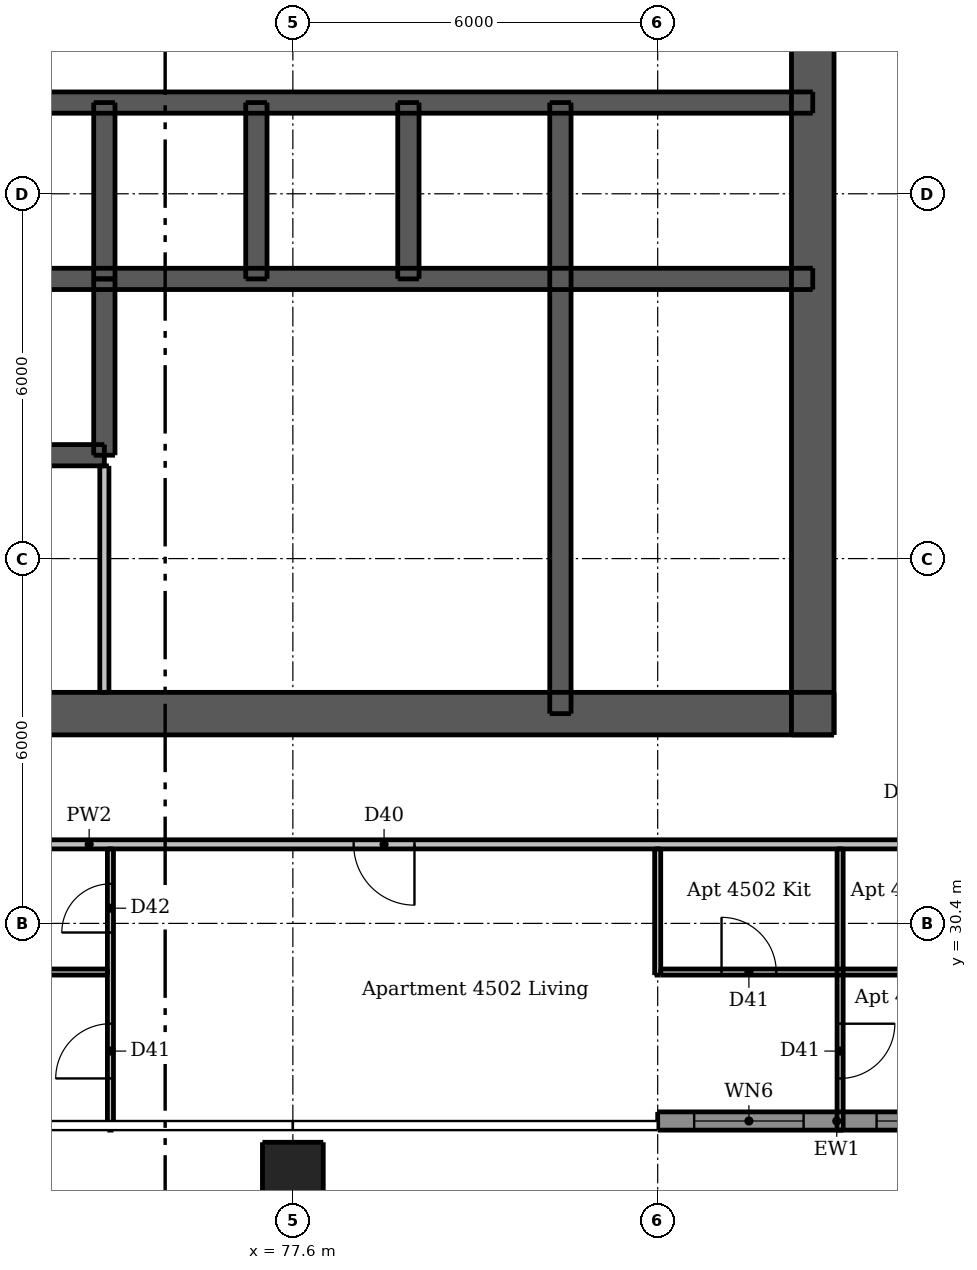
"""IFC4 building model, lengths in metres.
Left out: names, types, materials, properties, quantities, classifications, styles, units other than length and angle.
Written with IfcOpenShell. Run it as: python <this file> out.ifc"""

import sys

from ifc_helpers import new_model, si_unit, direction, frame, frame_2d, origin, origin_2d, place, context, subcontext, project, spatial, rectangle, extrude, element, fill, save


model = new_model("IFC4")
c1 = context("Model", 3, precision=1e-05, world=origin(), true_north=direction((0.0, 1.0)))
c2 = subcontext(c1, "Body", "Model", "MODEL_VIEW")
j1 = project(units=[si_unit("LENGTHUNIT", "METRE"), si_unit("PLANEANGLEUNIT", "RADIAN")], contexts=[c1])
p1 = place(None, origin())
s1 = spatial("IfcSite", under=j1, at=p1, CompositionType="ELEMENT")
p2 = place(p1, origin())
s2 = spatial("IfcBuilding", under=s1, at=p2, CompositionType="ELEMENT")
p3 = place(p2, frame((0.0, 0.0, 168.1)))
s3 = spatial("IfcBuildingStorey", under=s2, at=p3, CompositionType="ELEMENT", Elevation=168.1)
p4 = place(p3, frame((62.5, 33.85, 0.0), z_axis=(0.0, 0.0, 1.0), x_axis=(1.0, 0.0, 0.0)))
e1 = element("IfcWall", 1, at=p4, inside=s3, PredefinedType="SHEAR", context=c2, shape_type="SweptSolid", body=[
    extrude(rectangle(XDim=24.0, YDim=0.7, at=frame_2d((12.0, 0.0))), origin(), (0.0, 0.0, 1.0), 3.05),
])
p5 = place(p4, frame((1.962, 0.0, 0.0)))
e2 = element("IfcOpeningElement", 2, at=p5, cuts=e1, PredefinedType="OPENING", context=c2, shape_type="SweptSolid", body=[
    extrude(rectangle(XDim=1.1, YDim=2.1, at=frame_2d((0.55, 1.05))), frame((0.0, 0.36, 0.0), z_axis=(0.0, -1.0, 0.0), x_axis=(1.0, 0.0, 0.0)), (0.0, 0.0, 1.0), 0.72),
])
p6 = place(p4, frame((20.938, 0.0, 0.0)))
e3 = element("IfcOpeningElement", 3, at=p6, cuts=e1, PredefinedType="OPENING", context=c2, shape_type="SweptSolid", body=[
    extrude(rectangle(XDim=1.1, YDim=2.1, at=frame_2d((0.55, 1.05))), frame((0.0, 0.36, 0.0), z_axis=(0.0, -1.0, 0.0), x_axis=(1.0, 0.0, 0.0)), (0.0, 0.0, 1.0), 0.72),
])
p7 = place(p4, frame((8.0, 0.0, 0.0)))
e4 = element("IfcOpeningElement", 4, at=p7, cuts=e1, PredefinedType="OPENING", context=c2, shape_type="SweptSolid", body=[
    extrude(rectangle(XDim=1.1, YDim=2.1, at=frame_2d((0.55, 1.05))), frame((0.0, 0.36, 0.0), z_axis=(0.0, -1.0, 0.0), x_axis=(1.0, 0.0, 0.0)), (0.0, 0.0, 1.0), 0.72),
])
p8 = place(p4, frame((15.3, 0.0, 0.0)))
e5 = element("IfcOpeningElement", 5, at=p8, cuts=e1, PredefinedType="OPENING", context=c2, shape_type="SweptSolid", body=[
    extrude(rectangle(XDim=0.9, YDim=2.1, at=frame_2d((0.45, 1.05))), frame((0.0, 0.36, 0.0), z_axis=(0.0, -1.0, 0.0), x_axis=(1.0, 0.0, 0.0)), (0.0, 0.0, 1.0), 0.72),
])
p9 = place(p3, frame((86.15, 33.5, 0.0), z_axis=(0.0, 0.0, 1.0), x_axis=(0.0, 1.0, 0.0)))
e6 = element("IfcWall", 6, at=p9, inside=s3, PredefinedType="SHEAR", context=c2, shape_type="SweptSolid", body=[
    extrude(rectangle(XDim=24.0, YDim=0.7, at=frame_2d((12.0, 0.0))), origin(), (0.0, 0.0, 1.0), 3.05),
])
p10 = place(p9, frame((11.2, 0.0, 0.0)))
e7 = element("IfcOpeningElement", 7, at=p10, cuts=e6, PredefinedType="OPENING", context=c2, shape_type="SweptSolid", body=[
    extrude(rectangle(XDim=1.6, YDim=2.1, at=frame_2d((0.8, 1.05))), frame((0.0, 0.36, 0.0), z_axis=(0.0, -1.0, 0.0), x_axis=(1.0, 0.0, 0.0)), (0.0, 0.0, 1.0), 0.72),
])
p11 = place(p3, frame((62.85, 41.0, 0.0), z_axis=(0.0, 0.0, 1.0), x_axis=(1.0, 0.0, 0.0)))
e8 = element("IfcWall", 8, at=p11, inside=s3, PredefinedType="SHEAR", context=c2, shape_type="SweptSolid", body=[
    extrude(rectangle(XDim=23.3, YDim=0.35, at=frame_2d((11.65, 0.0))), origin(), (0.0, 0.0, 1.0), 3.05),
])
p12 = place(p3, frame((62.85, 43.9, 0.0), z_axis=(0.0, 0.0, 1.0), x_axis=(1.0, 0.0, 0.0)))
e9 = element("IfcWall", 9, at=p12, inside=s3, PredefinedType="SHEAR", context=c2, shape_type="SweptSolid", body=[
    extrude(rectangle(XDim=23.3, YDim=0.35, at=frame_2d((11.65, 0.0))), origin(), (0.0, 0.0, 1.0), 3.05),
])
p13 = place(p12, frame((0.806, 0.0, 0.0)))
e10 = element("IfcOpeningElement", 10, at=p13, cuts=e9, PredefinedType="OPENING", context=c2, shape_type="SweptSolid", body=[
    extrude(rectangle(XDim=0.9, YDim=2.1, at=frame_2d((0.45, 1.05))), frame((0.0, 0.185, 0.0), z_axis=(0.0, -1.0, 0.0), x_axis=(1.0, 0.0, 0.0)), (0.0, 0.0, 1.0), 0.37),
])
p14 = place(p12, frame((2.619, 0.0, 0.0)))
e11 = element("IfcOpeningElement", 11, at=p14, cuts=e9, PredefinedType="OPENING", context=c2, shape_type="SweptSolid", body=[
    extrude(rectangle(XDim=0.9, YDim=2.1, at=frame_2d((0.45, 1.05))), frame((0.0, 0.185, 0.0), z_axis=(0.0, -1.0, 0.0), x_axis=(1.0, 0.0, 0.0)), (0.0, 0.0, 1.0), 0.37),
])
p15 = place(p12, frame((20.688, 0.0, 0.0)))
e12 = element("IfcOpeningElement", 12, at=p15, cuts=e9, PredefinedType="OPENING", context=c2, shape_type="SweptSolid", body=[
    extrude(rectangle(XDim=0.9, YDim=2.1, at=frame_2d((0.45, 1.05))), frame((0.0, 0.185, 0.0), z_axis=(0.0, -1.0, 0.0), x_axis=(1.0, 0.0, 0.0)), (0.0, 0.0, 1.0), 0.37),
])
p16 = place(p12, frame((7.45, 0.0, 0.0)))
e13 = element("IfcOpeningElement", 13, at=p16, cuts=e9, PredefinedType="OPENING", context=c2, shape_type="SweptSolid", body=[
    extrude(rectangle(XDim=0.9, YDim=2.1, at=frame_2d((0.45, 1.05))), frame((0.0, 0.185, 0.0), z_axis=(0.0, -1.0, 0.0), x_axis=(1.0, 0.0, 0.0)), (0.0, 0.0, 1.0), 0.37),
])
p17 = place(p12, frame((9.95, 0.0, 0.0)))
e14 = element("IfcOpeningElement", 14, at=p17, cuts=e9, PredefinedType="OPENING", context=c2, shape_type="SweptSolid", body=[
    extrude(rectangle(XDim=0.9, YDim=2.1, at=frame_2d((0.45, 1.05))), frame((0.0, 0.185, 0.0), z_axis=(0.0, -1.0, 0.0), x_axis=(1.0, 0.0, 0.0)), (0.0, 0.0, 1.0), 0.37),
])
p18 = place(p12, frame((14.95, 0.0, 0.0)))
e15 = element("IfcOpeningElement", 15, at=p18, cuts=e9, PredefinedType="OPENING", context=c2, shape_type="SweptSolid", body=[
    extrude(rectangle(XDim=0.9, YDim=2.1, at=frame_2d((0.45, 1.05))), frame((0.0, 0.185, 0.0), z_axis=(0.0, -1.0, 0.0), x_axis=(1.0, 0.0, 0.0)), (0.0, 0.0, 1.0), 0.37),
])
p19 = place(p12, frame((17.45, 0.0, 0.0)))
e16 = element("IfcOpeningElement", 16, at=p19, cuts=e9, PredefinedType="OPENING", context=c2, shape_type="SweptSolid", body=[
    extrude(rectangle(XDim=0.9, YDim=2.1, at=frame_2d((0.45, 1.05))), frame((0.0, 0.185, 0.0), z_axis=(0.0, -1.0, 0.0), x_axis=(1.0, 0.0, 0.0)), (0.0, 0.0, 1.0), 0.37),
])
p20 = place(p3, frame((82.0, 33.85, 0.0), z_axis=(0.0, 0.0, 1.0), x_axis=(0.0, 1.0, 0.0)))
e17 = element("IfcWall", 17, at=p20, inside=s3, PredefinedType="SHEAR", context=c2, shape_type="SweptSolid", body=[
    extrude(rectangle(XDim=10.05, YDim=0.35, at=frame_2d((5.025, 0.0))), origin(), (0.0, 0.0, 1.0), 3.05),
])
for number, where, z_axis, x_axis in (
    (18, (74.5, 41.0, 0.0), (0.0, 0.0, 1.0), (0.0, 1.0, 0.0)),
    (19, (77.0, 41.0, 0.0), (0.0, 0.0, 1.0), (0.0, 1.0, 0.0)),
    (20, (79.5, 41.0, 0.0), (0.0, 0.0, 1.0), (0.0, 1.0, 0.0)),
):
    element("IfcWall", number, at=place(p3, frame(where, z_axis=z_axis, x_axis=x_axis)), inside=s3, PredefinedType="SHEAR", context=c2, shape_type="SweptSolid", body=[
        extrude(rectangle(XDim=2.9, YDim=0.35, at=frame_2d((1.45, 0.0))), origin(), (0.0, 0.0, 1.0), 3.05),
    ])
p21 = place(p3, frame((67.0, 38.1, 0.0), z_axis=(0.0, 0.0, 1.0), x_axis=(1.0, 0.0, 0.0)))
e21 = element("IfcWall", 21, at=p21, inside=s3, PredefinedType="SHEAR", context=c2, shape_type="SweptSolid", body=[
    extrude(rectangle(XDim=7.5, YDim=0.35, at=frame_2d((3.75, 0.0))), origin(), (0.0, 0.0, 1.0), 3.05),
])
p22 = place(p21, frame((0.7, 0.0, 0.0)))
e22 = element("IfcOpeningElement", 22, at=p22, cuts=e21, PredefinedType="OPENING", context=c2, shape_type="SweptSolid", body=[
    extrude(rectangle(XDim=1.1, YDim=2.1, at=frame_2d((0.55, 1.05))), frame((0.0, 0.185, 0.0), z_axis=(0.0, -1.0, 0.0), x_axis=(1.0, 0.0, 0.0)), (0.0, 0.0, 1.0), 0.37),
])
p23 = place(p21, frame((3.2, 0.0, 0.0)))
e23 = element("IfcOpeningElement", 23, at=p23, cuts=e21, PredefinedType="OPENING", context=c2, shape_type="SweptSolid", body=[
    extrude(rectangle(XDim=1.1, YDim=2.1, at=frame_2d((0.55, 1.05))), frame((0.0, 0.185, 0.0), z_axis=(0.0, -1.0, 0.0), x_axis=(1.0, 0.0, 0.0)), (0.0, 0.0, 1.0), 0.37),
])
p24 = place(p21, frame((5.65, 0.0, 0.0)))
e24 = element("IfcOpeningElement", 24, at=p24, cuts=e21, PredefinedType="OPENING", context=c2, shape_type="SweptSolid", body=[
    extrude(rectangle(XDim=1.2, YDim=2.1, at=frame_2d((0.6, 1.05))), frame((0.0, 0.185, 0.0), z_axis=(0.0, -1.0, 0.0), x_axis=(1.0, 0.0, 0.0)), (0.0, 0.0, 1.0), 0.37),
])
p25 = place(p3, frame((74.5, 38.1, 0.0), z_axis=(0.0, 0.0, 1.0), x_axis=(0.0, 1.0, 0.0)))
e25 = element("IfcWall", 25, at=p25, inside=s3, PredefinedType="SHEAR", context=c2, shape_type="SweptSolid", body=[
    extrude(rectangle(XDim=2.9, YDim=0.35, at=frame_2d((1.45, 0.0))), origin(), (0.0, 0.0, 1.0), 3.05),
])
p26 = place(p3, frame((77.6, 26.3, 0.0), z_axis=(0.0, 0.0, 1.0), x_axis=(1.0, 0.0, 0.0)))
e26 = element("IfcColumn", 26, at=p26, inside=s3, PredefinedType="COLUMN", context=c2, shape_type="SweptSolid", body=[
    extrude(rectangle(XDim=1.0, YDim=1.0, at=origin_2d()), origin(), (0.0, 0.0, 1.0), 3.05),
])
p27 = place(p3, frame((83.6, 27.15, 0.0), z_axis=(0.0, 0.0, 1.0), x_axis=(1.0, 0.0, 0.0)))
e27 = element("IfcWall", 27, at=p27, inside=s3, PredefinedType="SOLIDWALL", context=c2, shape_type="SweptSolid", body=[
    extrude(rectangle(XDim=5.89, YDim=0.3, at=frame_2d((2.945, 0.0))), origin(), (0.0, 0.0, 1.0), 3.05),
])
p28 = place(p27, frame((0.6, 0.0, 0.15)))
e28 = element("IfcOpeningElement", 28, at=p28, cuts=e27, PredefinedType="OPENING", context=c2, shape_type="SweptSolid", body=[
    extrude(rectangle(XDim=1.8, YDim=2.1, at=frame_2d((0.9, 1.05))), frame((0.0, 0.16, 0.0), z_axis=(0.0, -1.0, 0.0), x_axis=(1.0, 0.0, 0.0)), (0.0, 0.0, 1.0), 0.32),
])
p29 = place(p27, frame((3.6, 0.0, 0.15)))
e29 = element("IfcOpeningElement", 29, at=p29, cuts=e27, PredefinedType="OPENING", context=c2, shape_type="SweptSolid", body=[
    extrude(rectangle(XDim=1.8, YDim=2.1, at=frame_2d((0.9, 1.05))), frame((0.0, 0.16, 0.0), z_axis=(0.0, -1.0, 0.0), x_axis=(1.0, 0.0, 0.0)), (0.0, 0.0, 1.0), 0.32),
])
p30 = place(p3, frame((74.5, 34.2, 0.0), z_axis=(0.0, 0.0, 1.0), x_axis=(0.0, 1.0, 0.0)))
e30 = element("IfcWall", 30, at=p30, inside=s3, PredefinedType="PLUMBINGWALL", context=c2, shape_type="SweptSolid", body=[
    extrude(rectangle(XDim=3.725, YDim=0.15, at=frame_2d((1.863, 0.0))), origin(), (0.0, 0.0, 1.0), 3.05),
])
p31 = place(p3, frame((74.6, 27.0, 0.0), z_axis=(0.0, 0.0, 1.0), x_axis=(0.0, 1.0, 0.0)))
e31 = element("IfcWall", 31, at=p31, inside=s3, PredefinedType="PARTITIONING", context=c2, shape_type="SweptSolid", body=[
    extrude(rectangle(XDim=4.625, YDim=0.1, at=frame_2d((2.312, 0.0))), origin(), (0.0, 0.0, 1.0), 3.05),
])
p32 = place(p31, frame((0.85, 0.0, 0.0)))
e32 = element("IfcOpeningElement", 32, at=p32, cuts=e31, PredefinedType="OPENING", context=c2, shape_type="SweptSolid", body=[
    extrude(rectangle(XDim=0.9, YDim=2.1, at=frame_2d((0.45, 1.05))), frame((0.0, 0.06, 0.0), z_axis=(0.0, -1.0, 0.0), x_axis=(1.0, 0.0, 0.0)), (0.0, 0.0, 1.0), 0.12),
])
p33 = place(p31, frame((3.25, 0.0, 0.0)))
e33 = element("IfcOpeningElement", 33, at=p33, cuts=e31, PredefinedType="OPENING", context=c2, shape_type="SweptSolid", body=[
    extrude(rectangle(XDim=0.8, YDim=2.1, at=frame_2d((0.4, 1.05))), frame((0.0, 0.06, 0.0), z_axis=(0.0, -1.0, 0.0), x_axis=(1.0, 0.0, 0.0)), (0.0, 0.0, 1.0), 0.12),
])
p34 = place(p3, frame((83.6, 29.55, 0.0), z_axis=(0.0, 0.0, 1.0), x_axis=(0.0, 1.0, 0.0)))
e34 = element("IfcWall", 34, at=p34, inside=s3, PredefinedType="PARTITIONING", context=c2, shape_type="SweptSolid", body=[
    extrude(rectangle(XDim=2.075, YDim=0.1, at=frame_2d((1.038, 0.0))), origin(), (0.0, 0.0, 1.0), 2.59),
])
p35 = place(p3, frame((86.6, 31.625, 0.0), z_axis=(0.0, 0.0, 1.0), x_axis=(0.0, -1.0, 0.0)))
e35 = element("IfcWall", 35, at=p35, inside=s3, PredefinedType="PARTITIONING", context=c2, shape_type="SweptSolid", body=[
    extrude(rectangle(XDim=4.625, YDim=0.1, at=frame_2d((2.312, 0.0))), origin(), (0.0, 0.0, 1.0), 3.05),
])
p36 = place(p35, frame((2.875, 0.0, 0.0)))
e36 = element("IfcOpeningElement", 36, at=p36, cuts=e35, PredefinedType="OPENING", context=c2, shape_type="SweptSolid", body=[
    extrude(rectangle(XDim=0.9, YDim=2.1, at=frame_2d((0.45, 1.05))), frame((0.0, 0.06, 0.0), z_axis=(0.0, -1.0, 0.0), x_axis=(1.0, 0.0, 0.0)), (0.0, 0.0, 1.0), 0.12),
])
p37 = place(p3, frame((71.05, 29.6, 0.0), z_axis=(0.0, 0.0, 1.0), x_axis=(1.0, 0.0, 0.0)))
e37 = element("IfcWall", 37, at=p37, inside=s3, PredefinedType="PARTITIONING", context=c2, shape_type="SweptSolid", body=[
    extrude(rectangle(XDim=3.5, YDim=0.1, at=frame_2d((1.75, 0.0))), origin(), (0.0, 0.0, 1.0), 3.05),
])
p38 = place(p3, frame((83.65, 29.6, 0.0), z_axis=(0.0, 0.0, 1.0), x_axis=(1.0, 0.0, 0.0)))
e38 = element("IfcWall", 38, at=p38, inside=s3, PredefinedType="PARTITIONING", context=c2, shape_type="SweptSolid", body=[
    extrude(rectangle(XDim=5.875, YDim=0.1, at=frame_2d((2.938, 0.0))), origin(), (0.0, 0.0, 1.0), 3.05),
])
p39 = place(p38, frame((1.0, 0.0, 0.0)))
e39 = element("IfcOpeningElement", 39, at=p39, cuts=e38, PredefinedType="OPENING", context=c2, shape_type="SweptSolid", body=[
    extrude(rectangle(XDim=0.9, YDim=2.1, at=frame_2d((0.45, 1.05))), frame((0.0, 0.06, 0.0), z_axis=(0.0, -1.0, 0.0), x_axis=(1.0, 0.0, 0.0)), (0.0, 0.0, 1.0), 0.12),
])
p40 = place(p38, frame((4.05, 0.0, 0.0)))
e40 = element("IfcOpeningElement", 40, at=p40, cuts=e38, PredefinedType="OPENING", context=c2, shape_type="SweptSolid", body=[
    extrude(rectangle(XDim=0.8, YDim=2.1, at=frame_2d((0.4, 1.05))), frame((0.0, 0.06, 0.0), z_axis=(0.0, -1.0, 0.0), x_axis=(1.0, 0.0, 0.0)), (0.0, 0.0, 1.0), 0.12),
])
p41 = place(p3, frame((89.525, 31.7, 0.0), z_axis=(0.0, 0.0, 1.0), x_axis=(-1.0, 0.0, 0.0)))
e41 = element("IfcWall", 41, at=p41, inside=s3, PredefinedType="PARTITIONING", context=c2, shape_type="SweptSolid", body=[
    extrude(rectangle(XDim=30.55, YDim=0.15, at=frame_2d((15.275, 0.0))), origin(), (0.0, 0.0, 1.0), 3.05),
])
p42 = place(p41, frame((28.275, 0.0, 0.0)))
e42 = element("IfcOpeningElement", 42, at=p42, cuts=e41, PredefinedType="OPENING", context=c2, shape_type="SweptSolid", body=[
    extrude(rectangle(XDim=1.0, YDim=2.1, at=frame_2d((0.5, 1.05))), frame((0.0, 0.085, 0.0), z_axis=(0.0, -1.0, 0.0), x_axis=(1.0, 0.0, 0.0)), (0.0, 0.0, 1.0), 0.17),
])
p43 = place(p41, frame((9.925, 0.0, 0.0)))
e43 = element("IfcOpeningElement", 43, at=p43, cuts=e41, PredefinedType="OPENING", context=c2, shape_type="SweptSolid", body=[
    extrude(rectangle(XDim=1.0, YDim=2.1, at=frame_2d((0.5, 1.05))), frame((0.0, 0.085, 0.0), z_axis=(0.0, -1.0, 0.0), x_axis=(1.0, 0.0, 0.0)), (0.0, 0.0, 1.0), 0.17),
])
p44 = place(p28, origin())
e44 = element("IfcWindow", 44, at=p44, inside=s3, PartitioningType="DOUBLE_PANEL_VERTICAL", PredefinedType="WINDOW", context=c2, shape_type="SweptSolid", body=[
    extrude(rectangle(XDim=1.8, YDim=2.1, at=frame_2d((0.9, 1.05))), frame((0.0, 0.03, 0.0), z_axis=(0.0, -1.0, 0.0), x_axis=(1.0, 0.0, 0.0)), (0.0, 0.0, 1.0), 0.06),
])
fill(e28, e44)
p45 = place(p29, origin())
e45 = element("IfcWindow", 45, at=p45, inside=s3, PartitioningType="DOUBLE_PANEL_VERTICAL", PredefinedType="WINDOW", context=c2, shape_type="SweptSolid", body=[
    extrude(rectangle(XDim=1.8, YDim=2.1, at=frame_2d((0.9, 1.05))), frame((0.0, 0.03, 0.0), z_axis=(0.0, -1.0, 0.0), x_axis=(1.0, 0.0, 0.0)), (0.0, 0.0, 1.0), 0.06),
])
fill(e29, e45)
p46 = place(p6, origin())
e46 = element("IfcDoor", 46, at=p46, inside=s3, OperationType="SINGLE_SWING_RIGHT", PredefinedType="DOOR", context=c2, shape_type="SweptSolid", body=[
    extrude(rectangle(XDim=1.1, YDim=2.1, at=frame_2d((0.55, 1.05))), frame((0.0, 0.337, 0.0), z_axis=(0.0, -1.0, 0.0), x_axis=(1.0, 0.0, 0.0)), (0.0, 0.0, 1.0), 0.05),
])
fill(e3, e46)
p47 = place(p10, origin())
e47 = element("IfcDoor", 47, at=p47, inside=s3, OperationType="DOUBLE_DOOR_SINGLE_SWING", PredefinedType="DOOR", context=c2, shape_type="SweptSolid", body=[
    extrude(rectangle(XDim=1.6, YDim=2.1, at=frame_2d((0.8, 1.05))), frame((0.0, 0.337, 0.0), z_axis=(0.0, -1.0, 0.0), x_axis=(1.0, 0.0, 0.0)), (0.0, 0.0, 1.0), 0.05),
])
fill(e7, e47)
p48 = place(p8, origin())
e48 = element("IfcDoor", 48, at=p48, inside=s3, OperationType="SINGLE_SWING_LEFT", PredefinedType="DOOR", context=c2, shape_type="SweptSolid", body=[
    extrude(rectangle(XDim=0.9, YDim=2.1, at=frame_2d((0.45, 1.05))), frame((0.0, 0.337, 0.0), z_axis=(0.0, -1.0, 0.0), x_axis=(1.0, 0.0, 0.0)), (0.0, 0.0, 1.0), 0.05),
])
fill(e5, e48)
p49 = place(p15, origin())
e49 = element("IfcDoor", 49, at=p49, inside=s3, OperationType="SINGLE_SWING_LEFT", PredefinedType="DOOR", context=c2, shape_type="SweptSolid", body=[
    extrude(rectangle(XDim=0.9, YDim=2.1, at=frame_2d((0.45, 1.05))), frame((0.0, -0.112, 0.0), z_axis=(0.0, -1.0, 0.0), x_axis=(1.0, 0.0, 0.0)), (0.0, 0.0, 1.0), 0.05),
])
fill(e12, e49)
p50 = place(p17, origin())
e50 = element("IfcDoor", 50, at=p50, inside=s3, OperationType="SINGLE_SWING_RIGHT", PredefinedType="DOOR", context=c2, shape_type="SweptSolid", body=[
    extrude(rectangle(XDim=0.9, YDim=2.1, at=frame_2d((0.45, 1.05))), frame((0.0, -0.112, 0.0), z_axis=(0.0, -1.0, 0.0), x_axis=(1.0, 0.0, 0.0)), (0.0, 0.0, 1.0), 0.05),
])
fill(e14, e50)
p51 = place(p18, origin())
e51 = element("IfcDoor", 51, at=p51, inside=s3, OperationType="SINGLE_SWING_RIGHT", PredefinedType="DOOR", context=c2, shape_type="SweptSolid", body=[
    extrude(rectangle(XDim=0.9, YDim=2.1, at=frame_2d((0.45, 1.05))), frame((0.0, -0.112, 0.0), z_axis=(0.0, -1.0, 0.0), x_axis=(1.0, 0.0, 0.0)), (0.0, 0.0, 1.0), 0.05),
])
fill(e15, e51)
p52 = place(p19, origin())
e52 = element("IfcDoor", 52, at=p52, inside=s3, OperationType="SINGLE_SWING_LEFT", PredefinedType="DOOR", context=c2, shape_type="SweptSolid", body=[
    extrude(rectangle(XDim=0.9, YDim=2.1, at=frame_2d((0.45, 1.05))), frame((0.0, -0.112, 0.0), z_axis=(0.0, -1.0, 0.0), x_axis=(1.0, 0.0, 0.0)), (0.0, 0.0, 1.0), 0.05),
])
fill(e16, e52)
p53 = place(p24, origin())
e53 = element("IfcDoor", 53, at=p53, inside=s3, OperationType="DOUBLE_DOOR_SLIDING", PredefinedType="DOOR", context=c2, shape_type="SweptSolid", body=[
    extrude(rectangle(XDim=1.2, YDim=2.1, at=frame_2d((0.6, 1.05))), frame((0.0, 0.025, 0.0), z_axis=(0.0, -1.0, 0.0), x_axis=(1.0, 0.0, 0.0)), (0.0, 0.0, 1.0), 0.05),
])
fill(e24, e53)
p54 = place(p43, origin())
e54 = element("IfcDoor", 54, at=p54, inside=s3, OperationType="SINGLE_SWING_LEFT", PredefinedType="DOOR", context=c2, shape_type="SweptSolid", body=[
    extrude(rectangle(XDim=1.0, YDim=2.1, at=frame_2d((0.5, 1.05))), frame((0.0, 0.025, 0.0), z_axis=(0.0, -1.0, 0.0), x_axis=(1.0, 0.0, 0.0)), (0.0, 0.0, 1.0), 0.05),
])
fill(e43, e54)
p55 = place(p39, origin())
e55 = element("IfcDoor", 55, at=p55, inside=s3, OperationType="SINGLE_SWING_LEFT", PredefinedType="DOOR", context=c2, shape_type="SweptSolid", body=[
    extrude(rectangle(XDim=0.9, YDim=2.1, at=frame_2d((0.45, 1.05))), frame((0.0, 0.025, 0.0), z_axis=(0.0, -1.0, 0.0), x_axis=(1.0, 0.0, 0.0)), (0.0, 0.0, 1.0), 0.05),
])
fill(e39, e55)
p56 = place(p32, origin())
e56 = element("IfcDoor", 56, at=p56, inside=s3, OperationType="SINGLE_SWING_LEFT", PredefinedType="DOOR", context=c2, shape_type="SweptSolid", body=[
    extrude(rectangle(XDim=0.9, YDim=2.1, at=frame_2d((0.45, 1.05))), frame((0.0, 0.025, 0.0), z_axis=(0.0, -1.0, 0.0), x_axis=(1.0, 0.0, 0.0)), (0.0, 0.0, 1.0), 0.05),
])
fill(e32, e56)
p57 = place(p33, origin())
e57 = element("IfcDoor", 57, at=p57, inside=s3, OperationType="SINGLE_SWING_LEFT", PredefinedType="DOOR", context=c2, shape_type="SweptSolid", body=[
    extrude(rectangle(XDim=0.8, YDim=2.1, at=frame_2d((0.4, 1.05))), frame((0.0, 0.025, 0.0), z_axis=(0.0, -1.0, 0.0), x_axis=(1.0, 0.0, 0.0)), (0.0, 0.0, 1.0), 0.05),
])
fill(e33, e57)
p58 = place(p36, origin())
e58 = element("IfcDoor", 58, at=p58, inside=s3, OperationType="SINGLE_SWING_LEFT", PredefinedType="DOOR", context=c2, shape_type="SweptSolid", body=[
    extrude(rectangle(XDim=0.9, YDim=2.1, at=frame_2d((0.45, 1.05))), frame((0.0, 0.025, 0.0), z_axis=(0.0, -1.0, 0.0), x_axis=(1.0, 0.0, 0.0)), (0.0, 0.0, 1.0), 0.05),
])
fill(e36, e58)
save(model, sys.argv[1])
